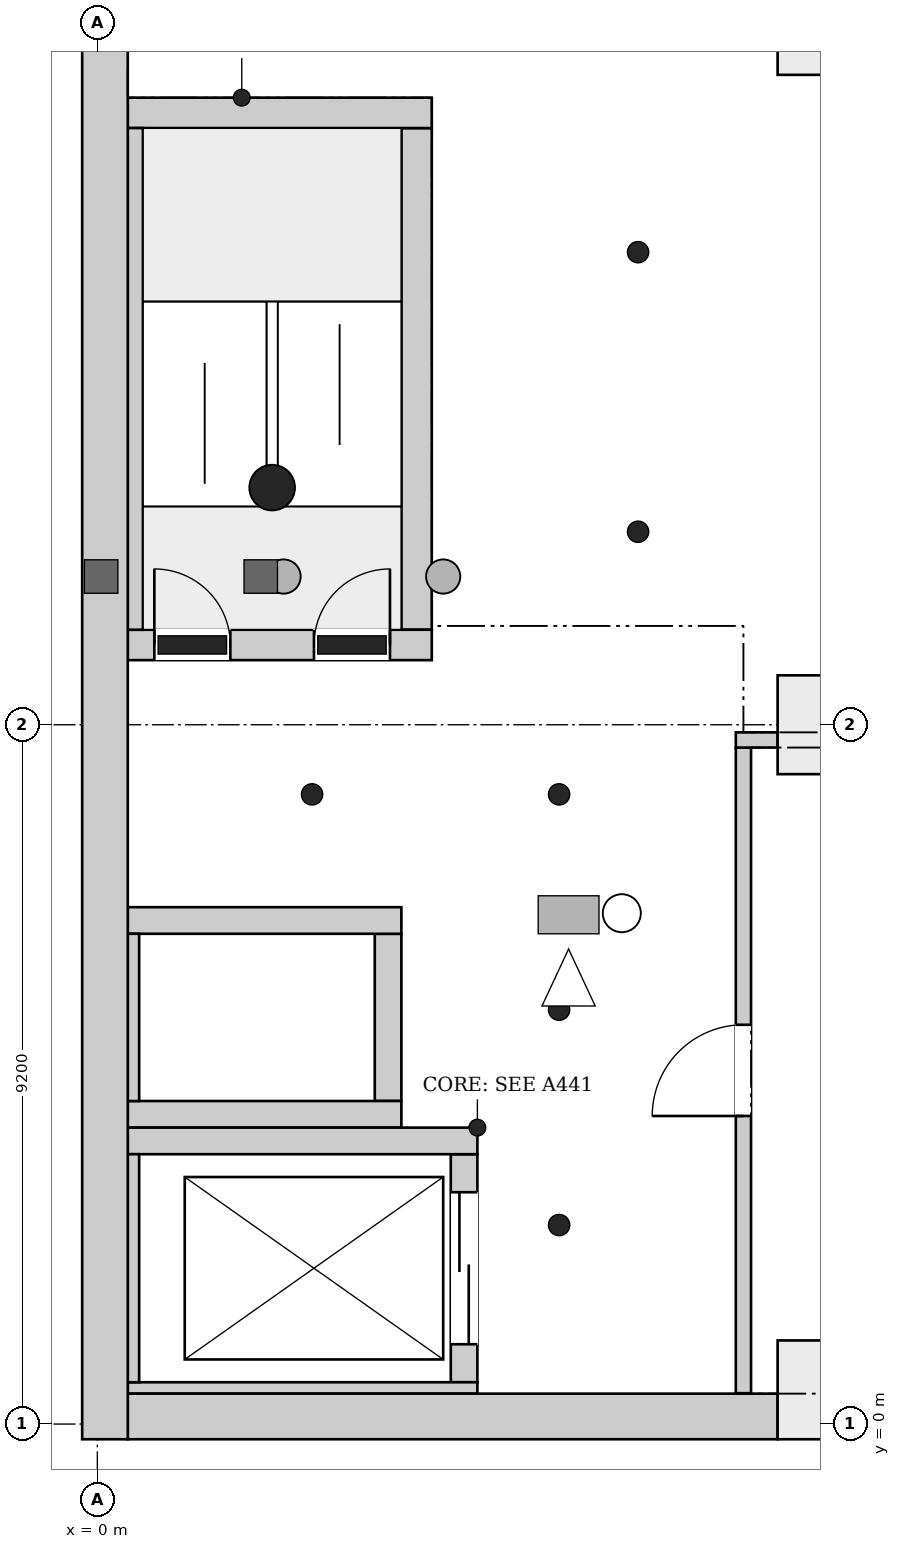
"""IFC4 building model, lengths in metres.
Left out: names, types, materials, properties, quantities, classifications, styles, units other than length and angle.
Written with IfcOpenShell. Run it as: python <this file> out.ifc"""

import sys

from ifc_helpers import new_model, si_unit, direction, frame, frame_2d, origin, origin_2d, place, context, subcontext, project, spatial, rectangle, extrude, element, fill, save


model = new_model("IFC4")
c1 = context("Model", 3, precision=1e-05, world=origin(), true_north=direction((0.0, 1.0)))
c2 = subcontext(c1, "Body", "Model", "MODEL_VIEW")
j1 = project(units=[si_unit("LENGTHUNIT", "METRE"), si_unit("PLANEANGLEUNIT", "RADIAN")], contexts=[c1])
p1 = place(None, origin())
s1 = spatial("IfcSite", under=j1, at=p1, CompositionType="ELEMENT")
p2 = place(p1, origin())
s2 = spatial("IfcBuilding", under=s1, at=p2, CompositionType="ELEMENT")
p3 = place(p2, frame((0.0, 0.0, -5.5)))
s3 = spatial("IfcBuildingStorey", under=s2, at=p3, CompositionType="ELEMENT", Elevation=-5.5)
p4 = place(p3, frame((0.101, -0.2, 0.0), z_axis=(0.0, 0.0, 1.0), x_axis=(0.0, 1.0, 0.0)))
e1 = element("IfcWall", 1, at=p4, inside=s3, PredefinedType="SOLIDWALL", context=c2, shape_type="SweptSolid", body=[
    extrude(rectangle(XDim=46.88, YDim=0.6, at=frame_2d((23.44, 0.0))), origin(), (0.0, 0.0, 1.0), 5.5),
])
p5 = place(p3, frame((0.4, 0.1, 0.0), z_axis=(0.0, 0.0, 1.0), x_axis=(1.0, 0.0, 0.0)))
e2 = element("IfcWall", 2, at=p5, inside=s3, PredefinedType="SOLIDWALL", context=c2, shape_type="SweptSolid", body=[
    extrude(rectangle(XDim=8.55, YDim=0.6, at=frame_2d((4.275, 0.0))), origin(), (0.0, 0.0, 1.0), 5.5),
])
p6 = place(p3, frame((0.4, 10.25, 0.0), z_axis=(0.0, 0.0, 1.0), x_axis=(1.0, 0.0, 0.0)))
e3 = element("IfcWall", 3, at=p6, inside=s3, PredefinedType="SHEAR", context=c2, shape_type="SweptSolid", body=[
    extrude(rectangle(XDim=4.0, YDim=0.4, at=frame_2d((2.0, 0.0))), origin(), (0.0, 0.0, 1.0), 5.5),
])
p7 = place(p6, frame((0.35, 0.0, 0.0)))
e4 = element("IfcOpeningElement", 4, at=p7, cuts=e3, PredefinedType="OPENING", context=c2, shape_type="SweptSolid", body=[
    extrude(rectangle(XDim=1.0, YDim=2.1, at=frame_2d((0.5, 1.05))), frame((0.0, 0.21, 0.0), z_axis=(0.0, -1.0, 0.0), x_axis=(1.0, 0.0, 0.0)), (0.0, 0.0, 1.0), 0.42),
])
p8 = place(p6, frame((2.45, 0.0, 0.0)))
e5 = element("IfcOpeningElement", 5, at=p8, cuts=e3, PredefinedType="OPENING", context=c2, shape_type="SweptSolid", body=[
    extrude(rectangle(XDim=1.0, YDim=2.1, at=frame_2d((0.5, 1.05))), frame((0.0, 0.21, 0.0), z_axis=(0.0, -1.0, 0.0), x_axis=(1.0, 0.0, 0.0)), (0.0, 0.0, 1.0), 0.42),
])
p9 = place(p3, frame((0.4, 17.25, 0.0), z_axis=(0.0, 0.0, 1.0), x_axis=(1.0, 0.0, 0.0)))
e6 = element("IfcWall", 6, at=p9, inside=s3, PredefinedType="SHEAR", context=c2, shape_type="SweptSolid", body=[
    extrude(rectangle(XDim=4.0, YDim=0.4, at=frame_2d((2.0, 0.0))), origin(), (0.0, 0.0, 1.0), 5.5),
])
p10 = place(p3, frame((0.5, 10.45, 0.0), z_axis=(0.0, 0.0, 1.0), x_axis=(0.0, 1.0, 0.0)))
e7 = element("IfcWall", 7, at=p10, inside=s3, PredefinedType="SHEAR", context=c2, shape_type="SweptSolid", body=[
    extrude(rectangle(XDim=6.6, YDim=0.2, at=frame_2d((3.3, 0.0))), origin(), (0.0, 0.0, 1.0), 5.5),
])
p11 = place(p3, frame((4.2, 10.45, 0.0), z_axis=(0.0, 0.0, 1.0), x_axis=(0.0, 1.0, 0.0)))
e8 = element("IfcWall", 8, at=p11, inside=s3, PredefinedType="SHEAR", context=c2, shape_type="SweptSolid", body=[
    extrude(rectangle(XDim=6.6, YDim=0.4, at=frame_2d((3.3, 0.0))), origin(), (0.0, 0.0, 1.0), 5.5),
])
p12 = place(p3, frame((0.4, 0.475, -1.6), z_axis=(0.0, 0.0, 1.0), x_axis=(1.0, 0.0, 0.0)))
e9 = element("IfcWall", 9, at=p12, inside=s3, PredefinedType="SHEAR", context=c2, shape_type="SweptSolid", body=[
    extrude(rectangle(XDim=4.6, YDim=0.15, at=frame_2d((2.3, 0.0))), origin(), (0.0, 0.0, 1.0), 7.1),
])
p13 = place(p3, frame((0.4, 3.725, -1.6), z_axis=(0.0, 0.0, 1.0), x_axis=(1.0, 0.0, 0.0)))
e10 = element("IfcWall", 10, at=p13, inside=s3, PredefinedType="SHEAR", context=c2, shape_type="SweptSolid", body=[
    extrude(rectangle(XDim=4.6, YDim=0.35, at=frame_2d((2.3, 0.0))), origin(), (0.0, 0.0, 1.0), 7.1),
])
p14 = place(p3, frame((0.475, 0.55, -1.6), z_axis=(0.0, 0.0, 1.0), x_axis=(0.0, 1.0, 0.0)))
e11 = element("IfcWall", 11, at=p14, inside=s3, PredefinedType="SHEAR", context=c2, shape_type="SweptSolid", body=[
    extrude(rectangle(XDim=3.0, YDim=0.15, at=frame_2d((1.5, 0.0))), origin(), (0.0, 0.0, 1.0), 7.1),
])
p15 = place(p3, frame((4.825, 0.55, -1.6), z_axis=(0.0, 0.0, 1.0), x_axis=(0.0, 1.0, 0.0)))
e12 = element("IfcWall", 12, at=p15, inside=s3, PredefinedType="SHEAR", context=c2, shape_type="SweptSolid", body=[
    extrude(rectangle(XDim=3.0, YDim=0.35, at=frame_2d((1.5, 0.0))), origin(), (0.0, 0.0, 1.0), 7.1),
])
p16 = place(p15, frame((0.5, 0.0, 1.6)))
e13 = element("IfcOpeningElement", 13, at=p16, cuts=e12, PredefinedType="OPENING", context=c2, shape_type="SweptSolid", body=[
    extrude(rectangle(XDim=2.0, YDim=2.4, at=frame_2d((1.0, 1.2))), frame((0.0, 0.185, 0.0), z_axis=(0.0, -1.0, 0.0), x_axis=(1.0, 0.0, 0.0)), (0.0, 0.0, 1.0), 0.37),
])
for number, where, z_axis, x_axis in (
    (14, (0.4, 4.075, 0.0), (0.0, 0.0, 1.0), (1.0, 0.0, 0.0)),
    (15, (0.4, 6.625, 0.0), (0.0, 0.0, 1.0), (1.0, 0.0, 0.0)),
):
    element("IfcWall", number, at=place(p3, frame(where, z_axis=z_axis, x_axis=x_axis)), inside=s3, PredefinedType="SHEAR", context=c2, shape_type="SweptSolid", body=[
        extrude(rectangle(XDim=3.6, YDim=0.35, at=frame_2d((1.8, 0.0))), origin(), (0.0, 0.0, 1.0), 5.5),
    ])
p17 = place(p3, frame((0.475, 4.25, 0.0), z_axis=(0.0, 0.0, 1.0), x_axis=(0.0, 1.0, 0.0)))
e16 = element("IfcWall", 16, at=p17, inside=s3, PredefinedType="SHEAR", context=c2, shape_type="SweptSolid", body=[
    extrude(rectangle(XDim=2.2, YDim=0.15, at=frame_2d((1.1, 0.0))), origin(), (0.0, 0.0, 1.0), 5.5),
])
p18 = place(p3, frame((3.825, 4.25, 0.0), z_axis=(0.0, 0.0, 1.0), x_axis=(0.0, 1.0, 0.0)))
e17 = element("IfcWall", 17, at=p18, inside=s3, PredefinedType="SHEAR", context=c2, shape_type="SweptSolid", body=[
    extrude(rectangle(XDim=2.2, YDim=0.35, at=frame_2d((1.1, 0.0))), origin(), (0.0, 0.0, 1.0), 5.5),
])
for number, where, z_axis, x_axis in (
    (18, (9.6, 0.45, 0.0), (0.0, 0.0, 1.0), (1.0, 0.0, 0.0)),
    (19, (9.6, 9.2, 0.0), (0.0, 0.0, 1.0), (1.0, 0.0, 0.0)),
    (20, (9.6, 18.4, 0.0), (0.0, 0.0, 1.0), (1.0, 0.0, 0.0)),
):
    element("IfcColumn", number, at=place(p3, frame(where, z_axis=z_axis, x_axis=x_axis)), inside=s3, PredefinedType="COLUMN", context=c2, shape_type="SweptSolid", body=[
        extrude(rectangle(XDim=1.3, YDim=1.3, at=origin_2d()), origin(), (0.0, 0.0, 1.0), 5.5),
    ])
p19 = place(p3, frame((8.5, 0.406, 0.0), z_axis=(0.0, 0.0, 1.0), x_axis=(0.0, 1.0, 0.0)))
e21 = element("IfcWall", 21, at=p19, inside=s3, PredefinedType="PARTITIONING", context=c2, shape_type="SweptSolid", body=[
    extrude(rectangle(XDim=8.494, YDim=0.2, at=frame_2d((4.247, 0.0))), origin(), (0.0, 0.0, 1.0), 5.15),
])
p20 = place(p19, frame((3.647, 0.0, 0.0)))
e22 = element("IfcOpeningElement", 22, at=p20, cuts=e21, PredefinedType="OPENING", context=c2, shape_type="SweptSolid", body=[
    extrude(rectangle(XDim=1.2, YDim=2.1, at=frame_2d((0.6, 1.05))), frame((0.0, 0.11, 0.0), z_axis=(0.0, -1.0, 0.0), x_axis=(1.0, 0.0, 0.0)), (0.0, 0.0, 1.0), 0.22),
])
p21 = place(p3, frame((8.4, 9.0, 0.0), z_axis=(0.0, 0.0, 1.0), x_axis=(1.0, 0.0, 0.0)))
e23 = element("IfcWall", 23, at=p21, inside=s3, PredefinedType="PARTITIONING", context=c2, shape_type="SweptSolid", body=[
    extrude(rectangle(XDim=0.55, YDim=0.2, at=frame_2d((0.275, 0.0))), origin(), (0.0, 0.0, 1.0), 5.15),
])
p22 = place(p7, origin())
e24 = element("IfcDoor", 24, at=p22, inside=s3, OperationType="SINGLE_SWING_RIGHT", PredefinedType="DOOR", context=c2, shape_type="SweptSolid", body=[
    extrude(rectangle(XDim=1.0, YDim=2.1, at=frame_2d((0.5, 1.05))), frame((0.0, 0.025, 0.0), z_axis=(0.0, -1.0, 0.0), x_axis=(1.0, 0.0, 0.0)), (0.0, 0.0, 1.0), 0.05),
])
fill(e4, e24)
p23 = place(p8, origin())
e25 = element("IfcDoor", 25, at=p23, inside=s3, OperationType="SINGLE_SWING_LEFT", PredefinedType="DOOR", context=c2, shape_type="SweptSolid", body=[
    extrude(rectangle(XDim=1.0, YDim=2.1, at=frame_2d((0.5, 1.05))), frame((0.0, 0.025, 0.0), z_axis=(0.0, -1.0, 0.0), x_axis=(1.0, 0.0, 0.0)), (0.0, 0.0, 1.0), 0.05),
])
fill(e5, e25)
p24 = place(p16, origin())
e26 = element("IfcDoor", 26, at=p24, inside=s3, OperationType="DOUBLE_DOOR_SLIDING", PredefinedType="DOOR", context=c2, shape_type="SweptSolid", body=[
    extrude(rectangle(XDim=2.0, YDim=2.4, at=frame_2d((1.0, 1.2))), frame((0.0, 0.025, 0.0), z_axis=(0.0, -1.0, 0.0), x_axis=(1.0, 0.0, 0.0)), (0.0, 0.0, 1.0), 0.05),
])
fill(e13, e26)
p25 = place(p20, origin())
e27 = element("IfcDoor", 27, at=p25, inside=s3, OperationType="SINGLE_SWING_LEFT", PredefinedType="DOOR", context=c2, shape_type="SweptSolid", body=[
    extrude(rectangle(XDim=1.2, YDim=2.1, at=frame_2d((0.6, 1.05))), frame((0.0, 0.025, 0.0), z_axis=(0.0, -1.0, 0.0), x_axis=(1.0, 0.0, 0.0)), (0.0, 0.0, 1.0), 0.05),
])
fill(e22, e27)
save(model, sys.argv[1])
